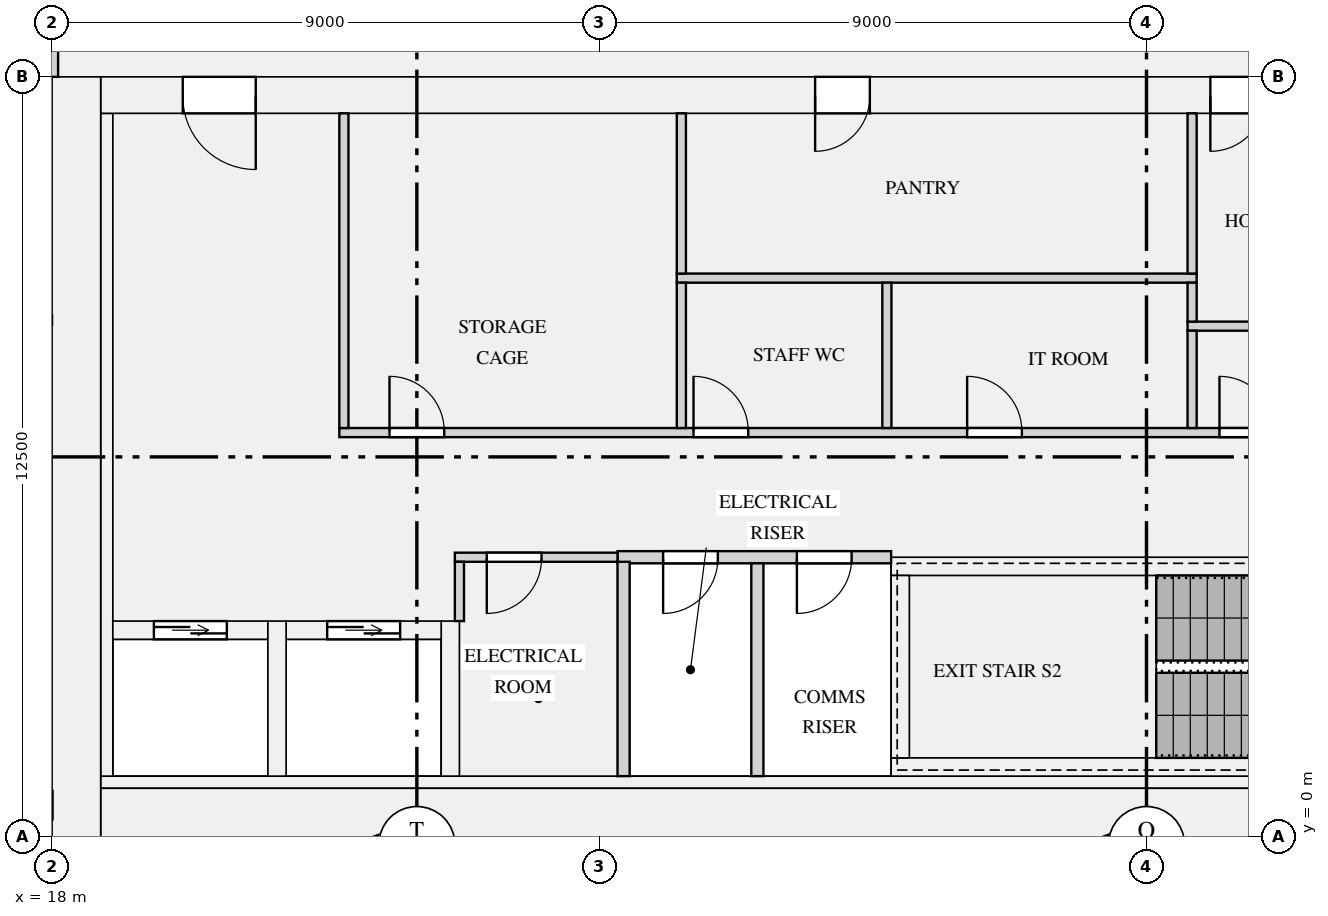
"""IFC4 building model, lengths in metres.
Left out: names, types, materials, properties, quantities, classifications, styles, units other than length and angle.
Written with IfcOpenShell. Run it as: python <this file> out.ifc"""

import sys

from ifc_helpers import new_model, si_unit, direction, frame, frame_2d, origin, place, context, subcontext, project, spatial, rectangle, extrude, element, fill, save


model = new_model("IFC4")
c1 = context("Model", 3, precision=1e-05, world=origin(), true_north=direction((0.0, 1.0)))
c2 = subcontext(c1, "Body", "Model", "MODEL_VIEW")
j1 = project(units=[si_unit("LENGTHUNIT", "METRE"), si_unit("PLANEANGLEUNIT", "RADIAN")], contexts=[c1])
p1 = place(None, origin())
s1 = spatial("IfcSite", under=j1, at=p1, CompositionType="ELEMENT")
p2 = place(p1, origin())
s2 = spatial("IfcBuilding", under=s1, at=p2, CompositionType="ELEMENT")
p3 = place(p2, frame((0.0, 0.0, 118.2)))
s3 = spatial("IfcBuildingStorey", under=s2, at=p3, CompositionType="ELEMENT", Elevation=118.2)
p4 = place(p3, frame((18.4, 0.0, 0.0), z_axis=(0.0, 0.0, 1.0), x_axis=(0.0, 1.0, 0.0)))
e1 = element("IfcWall", 1, at=p4, inside=s3, PredefinedType="SHEAR", context=c2, shape_type="SweptSolid", body=[
    extrude(rectangle(XDim=12.5, YDim=0.8, at=frame_2d((6.25, 0.0))), origin(), (0.0, 0.0, 1.0), 3.15),
])
p5 = place(p3, frame((18.8, 0.4, 0.0), z_axis=(0.0, 0.0, 1.0), x_axis=(1.0, 0.0, 0.0)))
e2 = element("IfcWall", 2, at=p5, inside=s3, PredefinedType="SHEAR", context=c2, shape_type="SweptSolid", body=[
    extrude(rectangle(XDim=34.4, YDim=0.8, at=frame_2d((17.2, 0.0))), origin(), (0.0, 0.0, 1.0), 3.15),
])
p6 = place(p3, frame((18.8, 12.2, 0.0), z_axis=(0.0, 0.0, 1.0), x_axis=(1.0, 0.0, 0.0)))
e3 = element("IfcWall", 3, at=p6, inside=s3, PredefinedType="SHEAR", context=c2, shape_type="SweptSolid", body=[
    extrude(rectangle(XDim=34.4, YDim=0.6, at=frame_2d((17.2, 0.0))), origin(), (0.0, 0.0, 1.0), 3.15),
])
p7 = place(p6, frame((24.375, 0.0, 0.0)))
e4 = element("IfcOpeningElement", 4, at=p7, cuts=e3, PredefinedType="OPENING", context=c2, shape_type="SweptSolid", body=[
    extrude(rectangle(XDim=1.1, YDim=2.1, at=frame_2d((0.55, 1.05))), frame((0.0, 0.31, 0.0), z_axis=(0.0, -1.0, 0.0), x_axis=(1.0, 0.0, 0.0)), (0.0, 0.0, 1.0), 0.62),
])
p8 = place(p6, frame((26.625, 0.0, 0.0)))
e5 = element("IfcOpeningElement", 5, at=p8, cuts=e3, PredefinedType="OPENING", context=c2, shape_type="SweptSolid", body=[
    extrude(rectangle(XDim=1.1, YDim=2.1, at=frame_2d((0.55, 1.05))), frame((0.0, 0.31, 0.0), z_axis=(0.0, -1.0, 0.0), x_axis=(1.0, 0.0, 0.0)), (0.0, 0.0, 1.0), 0.62),
])
p9 = place(p6, frame((28.875, 0.0, 0.0)))
e6 = element("IfcOpeningElement", 6, at=p9, cuts=e3, PredefinedType="OPENING", context=c2, shape_type="SweptSolid", body=[
    extrude(rectangle(XDim=1.1, YDim=2.1, at=frame_2d((0.55, 1.05))), frame((0.0, 0.31, 0.0), z_axis=(0.0, -1.0, 0.0), x_axis=(1.0, 0.0, 0.0)), (0.0, 0.0, 1.0), 0.62),
])
p10 = place(p6, frame((11.75, 0.0, 0.0)))
e7 = element("IfcOpeningElement", 7, at=p10, cuts=e3, PredefinedType="OPENING", context=c2, shape_type="SweptSolid", body=[
    extrude(rectangle(XDim=0.9, YDim=2.1, at=frame_2d((0.45, 1.05))), frame((0.0, 0.31, 0.0), z_axis=(0.0, -1.0, 0.0), x_axis=(1.0, 0.0, 0.0)), (0.0, 0.0, 1.0), 0.62),
])
p11 = place(p6, frame((18.25, 0.0, 0.0)))
e8 = element("IfcOpeningElement", 8, at=p11, cuts=e3, PredefinedType="OPENING", context=c2, shape_type="SweptSolid", body=[
    extrude(rectangle(XDim=0.9, YDim=2.1, at=frame_2d((0.45, 1.05))), frame((0.0, 0.31, 0.0), z_axis=(0.0, -1.0, 0.0), x_axis=(1.0, 0.0, 0.0)), (0.0, 0.0, 1.0), 0.62),
])
p12 = place(p6, frame((1.35, 0.0, 0.0)))
e9 = element("IfcOpeningElement", 9, at=p12, cuts=e3, PredefinedType="OPENING", context=c2, shape_type="SweptSolid", body=[
    extrude(rectangle(XDim=1.2, YDim=2.1, at=frame_2d((0.6, 1.05))), frame((0.0, 0.31, 0.0), z_axis=(0.0, -1.0, 0.0), x_axis=(1.0, 0.0, 0.0)), (0.0, 0.0, 1.0), 0.62),
])
p13 = place(p6, frame((31.85, 0.0, 0.0)))
e10 = element("IfcOpeningElement", 10, at=p13, cuts=e3, PredefinedType="OPENING", context=c2, shape_type="SweptSolid", body=[
    extrude(rectangle(XDim=1.2, YDim=2.1, at=frame_2d((0.6, 1.05))), frame((0.0, 0.31, 0.0), z_axis=(0.0, -1.0, 0.0), x_axis=(1.0, 0.0, 0.0)), (0.0, 0.0, 1.0), 0.62),
])
p14 = place(p3, frame((18.9, 1.0, 0.0), z_axis=(0.0, 0.0, 1.0), x_axis=(0.0, 1.0, 0.0)))
e11 = element("IfcWall", 11, at=p14, inside=s3, PredefinedType="SHEAR", context=c2, shape_type="SweptSolid", body=[
    extrude(rectangle(XDim=10.9, YDim=0.2, at=frame_2d((5.45, 0.0))), origin(), (0.0, 0.0, 1.0), 3.15),
])
p15 = place(p3, frame((18.8, 0.9, 0.0), z_axis=(0.0, 0.0, 1.0), x_axis=(1.0, 0.0, 0.0)))
e12 = element("IfcWall", 12, at=p15, inside=s3, PredefinedType="SHEAR", context=c2, shape_type="SweptSolid", body=[
    extrude(rectangle(XDim=34.4, YDim=0.2, at=frame_2d((17.2, 0.0))), origin(), (0.0, 0.0, 1.0), 3.15),
])
p16 = place(p3, frame((19.0, 3.4, 0.0), z_axis=(0.0, 0.0, 1.0), x_axis=(1.0, 0.0, 0.0)))
e13 = element("IfcWall", 13, at=p16, inside=s3, PredefinedType="SHEAR", context=c2, shape_type="SweptSolid", body=[
    extrude(rectangle(XDim=2.55, YDim=0.3, at=frame_2d((1.275, 0.0))), origin(), (0.0, 0.0, 1.0), 3.15),
])
p17 = place(p16, frame((0.675, 0.0, 0.0)))
e14 = element("IfcOpeningElement", 14, at=p17, cuts=e13, PredefinedType="OPENING", context=c2, shape_type="SweptSolid", body=[
    extrude(rectangle(XDim=1.2, YDim=2.1, at=frame_2d((0.6, 1.05))), frame((0.0, 0.16, 0.0), z_axis=(0.0, -1.0, 0.0), x_axis=(1.0, 0.0, 0.0)), (0.0, 0.0, 1.0), 0.32),
])
p18 = place(p3, frame((21.85, 3.4, 0.0), z_axis=(0.0, 0.0, 1.0), x_axis=(1.0, 0.0, 0.0)))
e15 = element("IfcWall", 15, at=p18, inside=s3, PredefinedType="SHEAR", context=c2, shape_type="SweptSolid", body=[
    extrude(rectangle(XDim=2.55, YDim=0.3, at=frame_2d((1.275, 0.0))), origin(), (0.0, 0.0, 1.0), 3.15),
])
p19 = place(p18, frame((0.675, 0.0, 0.0)))
e16 = element("IfcOpeningElement", 16, at=p19, cuts=e15, PredefinedType="OPENING", context=c2, shape_type="SweptSolid", body=[
    extrude(rectangle(XDim=1.2, YDim=2.1, at=frame_2d((0.6, 1.05))), frame((0.0, 0.16, 0.0), z_axis=(0.0, -1.0, 0.0), x_axis=(1.0, 0.0, 0.0)), (0.0, 0.0, 1.0), 0.32),
])
for number, where, z_axis, x_axis in (
    (17, (21.7, 1.0, 0.0), (0.0, 0.0, 1.0), (0.0, 1.0, 0.0)),
    (18, (24.55, 1.0, 0.0), (0.0, 0.0, 1.0), (0.0, 1.0, 0.0)),
):
    element("IfcWall", number, at=place(p3, frame(where, z_axis=z_axis, x_axis=x_axis)), inside=s3, PredefinedType="SHEAR", context=c2, shape_type="SweptSolid", body=[
        extrude(rectangle(XDim=2.55, YDim=0.3, at=frame_2d((1.275, 0.0))), origin(), (0.0, 0.0, 1.0), 3.15),
    ])
p20 = place(p3, frame((31.8, 1.15, 0.0), z_axis=(0.0, 0.0, 1.0), x_axis=(1.0, 0.0, 0.0)))
e19 = element("IfcWall", 19, at=p20, inside=s3, PredefinedType="SHEAR", context=c2, shape_type="SweptSolid", body=[
    extrude(rectangle(XDim=8.4, YDim=0.3, at=frame_2d((4.2, 0.0))), origin(), (0.0, 0.0, 1.0), 3.15),
])
p21 = place(p3, frame((31.8, 4.45, 0.0), z_axis=(0.0, 0.0, 1.0), x_axis=(1.0, 0.0, 0.0)))
e20 = element("IfcWall", 20, at=p21, inside=s3, PredefinedType="SHEAR", context=c2, shape_type="SweptSolid", body=[
    extrude(rectangle(XDim=8.4, YDim=0.3, at=frame_2d((4.2, 0.0))), origin(), (0.0, 0.0, 1.0), 3.15),
])
p22 = place(p21, frame((6.8, 0.0, 0.0)))
e21 = element("IfcOpeningElement", 21, at=p22, cuts=e20, PredefinedType="OPENING", context=c2, shape_type="SweptSolid", body=[
    extrude(rectangle(XDim=1.1, YDim=2.1, at=frame_2d((0.55, 1.05))), frame((0.0, 0.16, 0.0), z_axis=(0.0, -1.0, 0.0), x_axis=(1.0, 0.0, 0.0)), (0.0, 0.0, 1.0), 0.32),
])
p23 = place(p3, frame((31.95, 1.3, 0.0), z_axis=(0.0, 0.0, 1.0), x_axis=(0.0, 1.0, 0.0)))
e22 = element("IfcWall", 22, at=p23, inside=s3, PredefinedType="SHEAR", context=c2, shape_type="SweptSolid", body=[
    extrude(rectangle(XDim=3.0, YDim=0.3, at=frame_2d((1.5, 0.0))), origin(), (0.0, 0.0, 1.0), 3.15),
])
p24 = place(p3, frame((14.05, 0.525, 0.9), z_axis=(0.0, 0.0, 1.0), x_axis=(1.0, 0.0, 0.0)))
e23 = element("IfcWall", 23, at=p24, inside=s3, PredefinedType="SOLIDWALL", context=c2, shape_type="SweptSolid", body=[
    extrude(rectangle(XDim=3.95, YDim=0.45, at=frame_2d((1.975, 0.0))), origin(), (0.0, 0.0, 1.0), 1.93),
])
p25 = place(p24, frame((1.225, 0.0, 0.15)))
e24 = element("IfcOpeningElement", 24, at=p25, cuts=e23, PredefinedType="OPENING", context=c2, shape_type="SweptSolid", body=[
    extrude(rectangle(XDim=1.5, YDim=1.5, at=frame_2d((0.75, 0.75))), frame((0.0, 0.235, 0.0), z_axis=(0.0, -1.0, 0.0), x_axis=(1.0, 0.0, 0.0)), (0.0, 0.0, 1.0), 0.47),
])
p26 = place(p3, frame((27.3, 4.6, 0.0), z_axis=(0.0, 0.0, 1.0), x_axis=(1.0, 0.0, 0.0)))
e25 = element("IfcWall", 25, at=p26, inside=s3, PredefinedType="PARTITIONING", context=c2, shape_type="SweptSolid", body=[
    extrude(rectangle(XDim=4.5, YDim=0.2, at=frame_2d((2.25, 0.0))), origin(), (0.0, 0.0, 1.0), 2.83),
])
p27 = place(p26, frame((0.75, 0.0, 0.0)))
e26 = element("IfcOpeningElement", 26, at=p27, cuts=e25, PredefinedType="OPENING", context=c2, shape_type="SweptSolid", body=[
    extrude(rectangle(XDim=0.9, YDim=2.1, at=frame_2d((0.45, 1.05))), frame((0.0, 0.11, 0.0), z_axis=(0.0, -1.0, 0.0), x_axis=(1.0, 0.0, 0.0)), (0.0, 0.0, 1.0), 0.22),
])
p28 = place(p26, frame((2.95, 0.0, 0.0)))
e27 = element("IfcOpeningElement", 27, at=p28, cuts=e25, PredefinedType="OPENING", context=c2, shape_type="SweptSolid", body=[
    extrude(rectangle(XDim=0.9, YDim=2.1, at=frame_2d((0.45, 1.05))), frame((0.0, 0.11, 0.0), z_axis=(0.0, -1.0, 0.0), x_axis=(1.0, 0.0, 0.0)), (0.0, 0.0, 1.0), 0.22),
])
p29 = place(p3, frame((24.625, 4.6, 0.0), z_axis=(0.0, 0.0, 1.0), x_axis=(1.0, 0.0, 0.0)))
e28 = element("IfcWall", 28, at=p29, inside=s3, PredefinedType="PARTITIONING", context=c2, shape_type="SweptSolid", body=[
    extrude(rectangle(XDim=2.675, YDim=0.15, at=frame_2d((1.337, 0.0))), origin(), (0.0, 0.0, 1.0), 2.83),
])
p30 = place(p29, frame((0.525, 0.0, 0.0)))
e29 = element("IfcOpeningElement", 29, at=p30, cuts=e28, PredefinedType="OPENING", context=c2, shape_type="SweptSolid", body=[
    extrude(rectangle(XDim=0.9, YDim=2.1, at=frame_2d((0.45, 1.05))), frame((0.0, 0.085, 0.0), z_axis=(0.0, -1.0, 0.0), x_axis=(1.0, 0.0, 0.0)), (0.0, 0.0, 1.0), 0.17),
])
p31 = place(p3, frame((22.725, 6.65, 0.0), z_axis=(0.0, 0.0, 1.0), x_axis=(1.0, 0.0, 0.0)))
e30 = element("IfcWall", 30, at=p31, inside=s3, PredefinedType="PARTITIONING", context=c2, shape_type="SweptSolid", body=[
    extrude(rectangle(XDim=19.8, YDim=0.15, at=frame_2d((9.9, 0.0))), origin(), (0.0, 0.0, 1.0), 2.83),
])
p32 = place(p31, frame((0.825, 0.0, 0.0)))
e31 = element("IfcOpeningElement", 31, at=p32, cuts=e30, PredefinedType="OPENING", context=c2, shape_type="SweptSolid", body=[
    extrude(rectangle(XDim=0.9, YDim=2.1, at=frame_2d((0.45, 1.05))), frame((0.0, 0.085, 0.0), z_axis=(0.0, -1.0, 0.0), x_axis=(1.0, 0.0, 0.0)), (0.0, 0.0, 1.0), 0.17),
])
p33 = place(p31, frame((5.825, 0.0, 0.0)))
e32 = element("IfcOpeningElement", 32, at=p33, cuts=e30, PredefinedType="OPENING", context=c2, shape_type="SweptSolid", body=[
    extrude(rectangle(XDim=0.9, YDim=2.1, at=frame_2d((0.45, 1.05))), frame((0.0, 0.085, 0.0), z_axis=(0.0, -1.0, 0.0), x_axis=(1.0, 0.0, 0.0)), (0.0, 0.0, 1.0), 0.17),
])
p34 = place(p31, frame((10.325, 0.0, 0.0)))
e33 = element("IfcOpeningElement", 33, at=p34, cuts=e30, PredefinedType="OPENING", context=c2, shape_type="SweptSolid", body=[
    extrude(rectangle(XDim=0.9, YDim=2.1, at=frame_2d((0.45, 1.05))), frame((0.0, 0.085, 0.0), z_axis=(0.0, -1.0, 0.0), x_axis=(1.0, 0.0, 0.0)), (0.0, 0.0, 1.0), 0.17),
])
p35 = place(p31, frame((14.475, 0.0, 0.0)))
e34 = element("IfcOpeningElement", 34, at=p35, cuts=e30, PredefinedType="OPENING", context=c2, shape_type="SweptSolid", body=[
    extrude(rectangle(XDim=0.9, YDim=2.1, at=frame_2d((0.45, 1.05))), frame((0.0, 0.085, 0.0), z_axis=(0.0, -1.0, 0.0), x_axis=(1.0, 0.0, 0.0)), (0.0, 0.0, 1.0), 0.17),
])
p36 = place(p3, frame((36.675, 8.4, 0.0), z_axis=(0.0, 0.0, 1.0), x_axis=(1.0, 0.0, 0.0)))
e35 = element("IfcWall", 35, at=p36, inside=s3, PredefinedType="PARTITIONING", context=c2, shape_type="SweptSolid", body=[
    extrude(rectangle(XDim=5.775, YDim=0.15, at=frame_2d((2.887, 0.0))), origin(), (0.0, 0.0, 1.0), 2.83),
])
p37 = place(p3, frame((28.275, 9.19, 0.0), z_axis=(0.0, 0.0, 1.0), x_axis=(1.0, 0.0, 0.0)))
e36 = element("IfcWall", 36, at=p37, inside=s3, PredefinedType="PARTITIONING", context=c2, shape_type="SweptSolid", body=[
    extrude(rectangle(XDim=8.55, YDim=0.15, at=frame_2d((4.275, 0.0))), origin(), (0.0, 0.0, 1.0), 2.83),
])
p38 = place(p3, frame((27.4, 1.0, 0.0), z_axis=(0.0, 0.0, 1.0), x_axis=(0.0, 1.0, 0.0)))
e37 = element("IfcWall", 37, at=p38, inside=s3, PredefinedType="PARTITIONING", context=c2, shape_type="SweptSolid", body=[
    extrude(rectangle(XDim=3.525, YDim=0.2, at=frame_2d((1.762, 0.0))), origin(), (0.0, 0.0, 1.0), 2.83),
])
p39 = place(p3, frame((29.6, 1.0, 0.0), z_axis=(0.0, 0.0, 1.0), x_axis=(0.0, 1.0, 0.0)))
e38 = element("IfcWall", 38, at=p39, inside=s3, PredefinedType="PARTITIONING", context=c2, shape_type="SweptSolid", body=[
    extrude(rectangle(XDim=3.5, YDim=0.2, at=frame_2d((1.75, 0.0))), origin(), (0.0, 0.0, 1.0), 2.83),
])
p40 = place(p3, frame((24.7, 3.55, 0.0), z_axis=(0.0, 0.0, 1.0), x_axis=(0.0, 1.0, 0.0)))
e39 = element("IfcWall", 39, at=p40, inside=s3, PredefinedType="PARTITIONING", context=c2, shape_type="SweptSolid", body=[
    extrude(rectangle(XDim=0.975, YDim=0.15, at=frame_2d((0.487, 0.0))), origin(), (0.0, 0.0, 1.0), 2.83),
])
p41 = place(p3, frame((22.8, 6.725, 0.0), z_axis=(0.0, 0.0, 1.0), x_axis=(0.0, 1.0, 0.0)))
e40 = element("IfcWall", 40, at=p41, inside=s3, PredefinedType="PARTITIONING", context=c2, shape_type="SweptSolid", body=[
    extrude(rectangle(XDim=5.175, YDim=0.15, at=frame_2d((2.587, 0.0))), origin(), (0.0, 0.0, 1.0), 2.83),
])
for number, where, z_axis, x_axis in (
    (41, (28.35, 6.725, 0.0), (0.0, 0.0, 1.0), (0.0, 1.0, 0.0)),
    (42, (31.73, 6.725, 0.0), (0.0, 0.0, 1.0), (0.0, 1.0, 0.0)),
):
    element("IfcWall", number, at=place(p3, frame(where, z_axis=z_axis, x_axis=x_axis)), inside=s3, PredefinedType="PARTITIONING", context=c2, shape_type="SweptSolid", body=[
        extrude(rectangle(XDim=2.39, YDim=0.15, at=frame_2d((1.195, 0.0))), origin(), (0.0, 0.0, 1.0), 2.83),
    ])
p42 = place(p3, frame((36.75, 6.725, 0.0), z_axis=(0.0, 0.0, 1.0), x_axis=(0.0, 1.0, 0.0)))
e43 = element("IfcWall", 43, at=p42, inside=s3, PredefinedType="PARTITIONING", context=c2, shape_type="SweptSolid", body=[
    extrude(rectangle(XDim=1.6, YDim=0.15, at=frame_2d((0.8, 0.0))), origin(), (0.0, 0.0, 1.0), 2.83),
])
p43 = place(p3, frame((36.75, 8.475, 0.0), z_axis=(0.0, 0.0, 1.0), x_axis=(0.0, 1.0, 0.0)))
e44 = element("IfcWall", 44, at=p43, inside=s3, PredefinedType="PARTITIONING", context=c2, shape_type="SweptSolid", body=[
    extrude(rectangle(XDim=0.64, YDim=0.15, at=frame_2d((0.32, 0.0))), origin(), (0.0, 0.0, 1.0), 2.83),
])
for number, where, z_axis, x_axis in (
    (45, (28.35, 9.265, 0.0), (0.0, 0.0, 1.0), (0.0, 1.0, 0.0)),
    (46, (36.75, 9.265, 0.0), (0.0, 0.0, 1.0), (0.0, 1.0, 0.0)),
):
    element("IfcWall", number, at=place(p3, frame(where, z_axis=z_axis, x_axis=x_axis)), inside=s3, PredefinedType="PARTITIONING", context=c2, shape_type="SweptSolid", body=[
        extrude(rectangle(XDim=2.635, YDim=0.15, at=frame_2d((1.317, 0.0))), origin(), (0.0, 0.0, 1.0), 2.83),
    ])
p44 = place(p3, frame((18.0, 12.5, 0.0), z_axis=(0.0, 0.0, 1.0), x_axis=(0.0, 1.0, 0.0)))
e47 = element("IfcWall", 47, at=p44, inside=s3, PredefinedType="PARTITIONING", context=c2, shape_type="SweptSolid", body=[
    extrude(rectangle(XDim=3.4, YDim=0.2, at=frame_2d((1.7, 0.0))), origin(), (0.0, 0.0, 1.0), 2.83),
])
p45 = place(p17, origin())
e48 = element("IfcDoor", 48, at=p45, inside=s3, OperationType="DOUBLE_DOOR_SLIDING", PredefinedType="DOOR", context=c2, shape_type="SweptSolid", body=[
    extrude(rectangle(XDim=1.2, YDim=2.1, at=frame_2d((0.6, 1.05))), frame((0.0, 0.025, 0.0), z_axis=(0.0, -1.0, 0.0), x_axis=(1.0, 0.0, 0.0)), (0.0, 0.0, 1.0), 0.05),
])
fill(e14, e48)
p46 = place(p19, origin())
e49 = element("IfcDoor", 49, at=p46, inside=s3, OperationType="DOUBLE_DOOR_SLIDING", PredefinedType="DOOR", context=c2, shape_type="SweptSolid", body=[
    extrude(rectangle(XDim=1.2, YDim=2.1, at=frame_2d((0.6, 1.05))), frame((0.0, 0.025, 0.0), z_axis=(0.0, -1.0, 0.0), x_axis=(1.0, 0.0, 0.0)), (0.0, 0.0, 1.0), 0.05),
])
fill(e16, e49)
p47 = place(p30, frame((0.9, 0.0, 0.0), z_axis=(0.0, 0.0, 1.0), x_axis=(-1.0, 0.0, 0.0)))
e50 = element("IfcDoor", 50, at=p47, inside=s3, OperationType="SINGLE_SWING_RIGHT", PredefinedType="DOOR", context=c2, shape_type="SweptSolid", body=[
    extrude(rectangle(XDim=0.9, YDim=2.1, at=frame_2d((0.45, 1.05))), frame((0.0, 0.025, 0.0), z_axis=(0.0, -1.0, 0.0), x_axis=(1.0, 0.0, 0.0)), (0.0, 0.0, 1.0), 0.05),
])
fill(e29, e50)
p48 = place(p32, origin())
e51 = element("IfcDoor", 51, at=p48, inside=s3, OperationType="SINGLE_SWING_LEFT", PredefinedType="DOOR", context=c2, shape_type="SweptSolid", body=[
    extrude(rectangle(XDim=0.9, YDim=2.1, at=frame_2d((0.45, 1.05))), frame((0.0, 0.025, 0.0), z_axis=(0.0, -1.0, 0.0), x_axis=(1.0, 0.0, 0.0)), (0.0, 0.0, 1.0), 0.05),
])
fill(e31, e51)
p49 = place(p33, origin())
e52 = element("IfcDoor", 52, at=p49, inside=s3, OperationType="SINGLE_SWING_LEFT", PredefinedType="DOOR", context=c2, shape_type="SweptSolid", body=[
    extrude(rectangle(XDim=0.9, YDim=2.1, at=frame_2d((0.45, 1.05))), frame((0.0, 0.025, 0.0), z_axis=(0.0, -1.0, 0.0), x_axis=(1.0, 0.0, 0.0)), (0.0, 0.0, 1.0), 0.05),
])
fill(e32, e52)
p50 = place(p34, origin())
e53 = element("IfcDoor", 53, at=p50, inside=s3, OperationType="SINGLE_SWING_LEFT", PredefinedType="DOOR", context=c2, shape_type="SweptSolid", body=[
    extrude(rectangle(XDim=0.9, YDim=2.1, at=frame_2d((0.45, 1.05))), frame((0.0, 0.025, 0.0), z_axis=(0.0, -1.0, 0.0), x_axis=(1.0, 0.0, 0.0)), (0.0, 0.0, 1.0), 0.05),
])
fill(e33, e53)
p51 = place(p10, frame((0.9, 0.0, 0.0), z_axis=(0.0, 0.0, 1.0), x_axis=(-1.0, 0.0, 0.0)))
e54 = element("IfcDoor", 54, at=p51, inside=s3, OperationType="SINGLE_SWING_RIGHT", PredefinedType="DOOR", context=c2, shape_type="SweptSolid", body=[
    extrude(rectangle(XDim=0.9, YDim=2.1, at=frame_2d((0.45, 1.05))), frame((0.0, 0.025, 0.0), z_axis=(0.0, -1.0, 0.0), x_axis=(1.0, 0.0, 0.0)), (0.0, 0.0, 1.0), 0.05),
])
fill(e7, e54)
p52 = place(p35, origin())
e55 = element("IfcDoor", 55, at=p52, inside=s3, OperationType="SINGLE_SWING_LEFT", PredefinedType="DOOR", context=c2, shape_type="SweptSolid", body=[
    extrude(rectangle(XDim=0.9, YDim=2.1, at=frame_2d((0.45, 1.05))), frame((0.0, 0.025, 0.0), z_axis=(0.0, -1.0, 0.0), x_axis=(1.0, 0.0, 0.0)), (0.0, 0.0, 1.0), 0.05),
])
fill(e34, e55)
p53 = place(p11, frame((0.9, 0.0, 0.0), z_axis=(0.0, 0.0, 1.0), x_axis=(-1.0, 0.0, 0.0)))
e56 = element("IfcDoor", 56, at=p53, inside=s3, OperationType="SINGLE_SWING_RIGHT", PredefinedType="DOOR", context=c2, shape_type="SweptSolid", body=[
    extrude(rectangle(XDim=0.9, YDim=2.1, at=frame_2d((0.45, 1.05))), frame((0.0, 0.025, 0.0), z_axis=(0.0, -1.0, 0.0), x_axis=(1.0, 0.0, 0.0)), (0.0, 0.0, 1.0), 0.05),
])
fill(e8, e56)
p54 = place(p27, frame((0.9, 0.0, 0.0), z_axis=(0.0, 0.0, 1.0), x_axis=(-1.0, 0.0, 0.0)))
e57 = element("IfcDoor", 57, at=p54, inside=s3, OperationType="SINGLE_SWING_RIGHT", PredefinedType="DOOR", context=c2, shape_type="SweptSolid", body=[
    extrude(rectangle(XDim=0.9, YDim=2.1, at=frame_2d((0.45, 1.05))), frame((0.0, 0.025, 0.0), z_axis=(0.0, -1.0, 0.0), x_axis=(1.0, 0.0, 0.0)), (0.0, 0.0, 1.0), 0.05),
])
fill(e26, e57)
p55 = place(p28, frame((0.9, 0.0, 0.0), z_axis=(0.0, 0.0, 1.0), x_axis=(-1.0, 0.0, 0.0)))
e58 = element("IfcDoor", 58, at=p55, inside=s3, OperationType="SINGLE_SWING_RIGHT", PredefinedType="DOOR", context=c2, shape_type="SweptSolid", body=[
    extrude(rectangle(XDim=0.9, YDim=2.1, at=frame_2d((0.45, 1.05))), frame((0.0, 0.025, 0.0), z_axis=(0.0, -1.0, 0.0), x_axis=(1.0, 0.0, 0.0)), (0.0, 0.0, 1.0), 0.05),
])
fill(e27, e58)
p56 = place(p12, frame((1.2, 0.0, 0.0), z_axis=(0.0, 0.0, 1.0), x_axis=(-1.0, 0.0, 0.0)))
e59 = element("IfcDoor", 59, at=p56, inside=s3, OperationType="SINGLE_SWING_LEFT", PredefinedType="DOOR", context=c2, shape_type="SweptSolid", body=[
    extrude(rectangle(XDim=1.2, YDim=2.1, at=frame_2d((0.6, 1.05))), frame((0.0, 0.025, 0.0), z_axis=(0.0, -1.0, 0.0), x_axis=(1.0, 0.0, 0.0)), (0.0, 0.0, 1.0), 0.05),
])
fill(e9, e59)
save(model, sys.argv[1])
